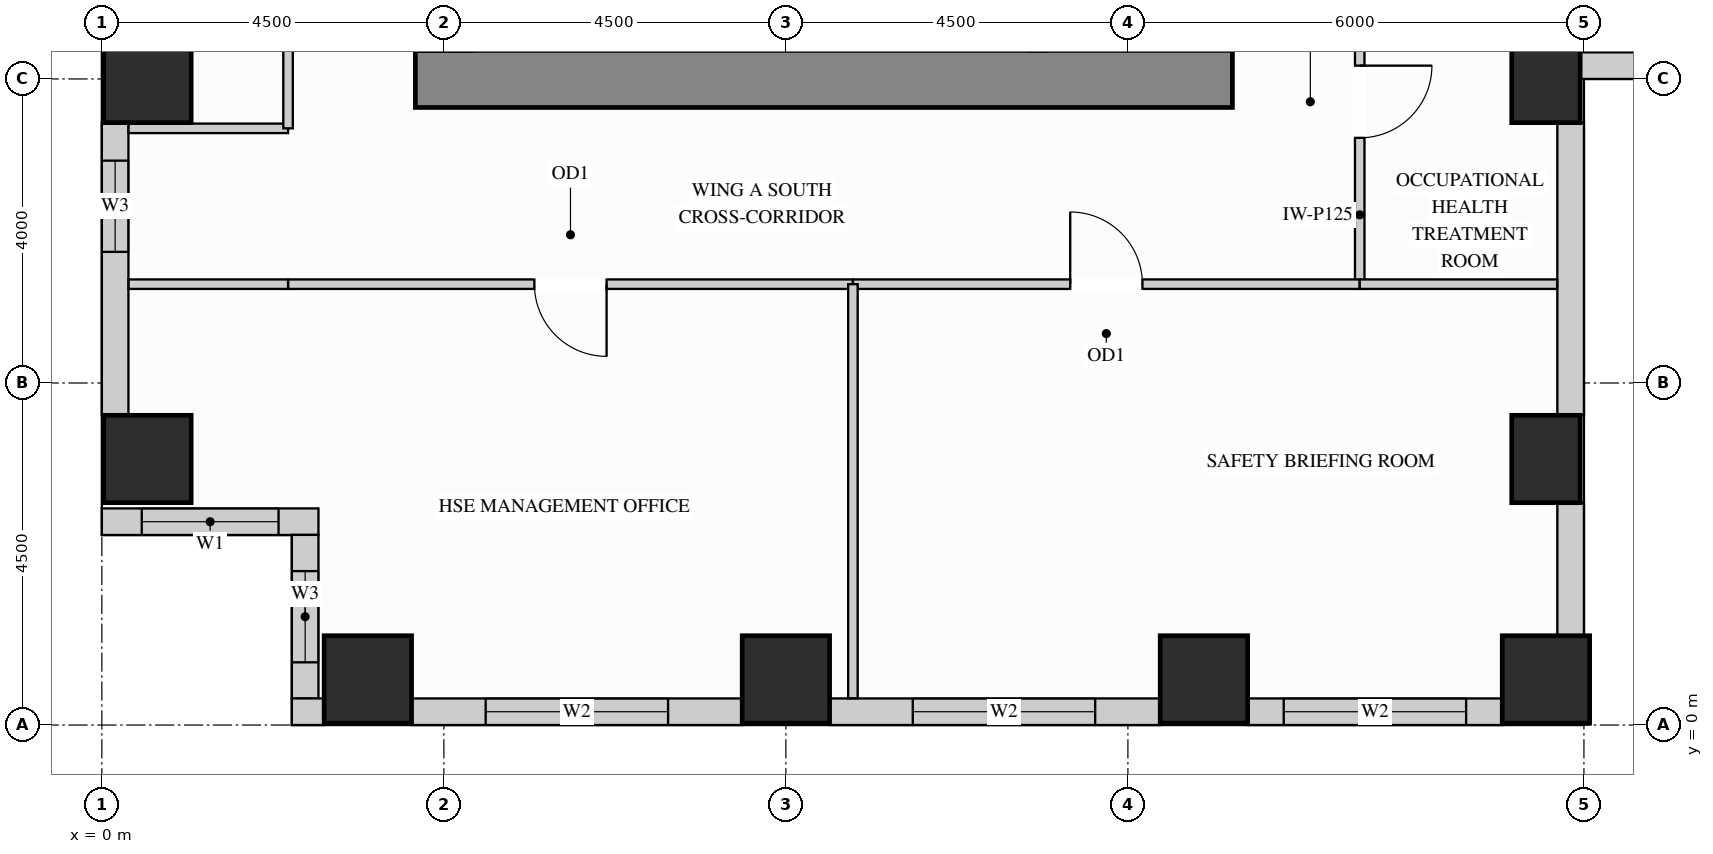
"""IFC4 building model, lengths in metres.
Left out: names, types, materials, properties, quantities, classifications, styles, units other than length and angle.
Written with IfcOpenShell. Run it as: python <this file> out.ifc"""

import sys

from ifc_helpers import new_model, si_unit, direction, frame, frame_2d, origin, origin_2d, place, context, subcontext, project, spatial, rectangle, extrude, source, transform, mapped, element, fill, save


model = new_model("IFC4")
c1 = context("Model", 3, precision=1e-05, world=origin(), true_north=direction((0.0, 1.0)))
c2 = subcontext(c1, "Body", "Model", "MODEL_VIEW")
j1 = project(units=[si_unit("LENGTHUNIT", "METRE"), si_unit("PLANEANGLEUNIT", "RADIAN")], contexts=[c1])
p1 = place(None, origin())
s1 = spatial("IfcSite", under=j1, at=p1, CompositionType="ELEMENT")
p2 = place(p1, origin())
s2 = spatial("IfcBuilding", under=s1, at=p2, CompositionType="ELEMENT")
p3 = place(p2, frame((0.0, 0.0, 91.8)))
s3 = spatial("IfcBuildingStorey", under=s2, at=p3, CompositionType="ELEMENT", Elevation=91.8)
m1 = source(origin(), c2, "Body", "SweptSolid", [
    extrude(rectangle(XDim=0.9, YDim=1.15, at=origin_2d()), origin(), (0.0, 0.0, 1.0), 3.38),
])
for number, where, z_axis, x_axis in (
    (1, (19.0, 3.5, 0.0), (0.0, 0.0, 1.0), (1.0, 0.0, 0.0)),
    (2, (19.0, 8.5, 0.0), (0.0, 0.0, 1.0), (1.0, 0.0, 0.0)),
):
    element("IfcColumn", number, at=place(p3, frame(where, z_axis=z_axis, x_axis=x_axis)), inside=s3, PredefinedType="COLUMN", context=c2, shape_type="MappedRepresentation", body=[
        mapped(m1, transform((0.0, 0.0, 0.0), x_axis=(1.0, 0.0, 0.0), y_axis=(0.0, 1.0, 0.0), z_axis=(0.0, 0.0, 1.0))),
    ])
m2 = source(origin(), c2, "Body", "SweptSolid", [
    extrude(rectangle(XDim=1.15, YDim=1.15, at=origin_2d()), origin(), (0.0, 0.0, 1.0), 3.38),
])
for number, where, z_axis, x_axis in (
    (3, (14.5, 0.6, 0.0), (0.0, 0.0, 1.0), (1.0, 0.0, 0.0)),
    (4, (19.0, 0.6, 0.0), (0.0, 0.0, 1.0), (1.0, 0.0, 0.0)),
    (5, (3.5, 0.6, 0.0), (0.0, 0.0, 1.0), (1.0, 0.0, 0.0)),
    (6, (9.0, 0.6, 0.0), (0.0, 0.0, 1.0), (1.0, 0.0, 0.0)),
    (7, (0.6, 3.5, 0.0), (0.0, 0.0, 1.0), (1.0, 0.0, 0.0)),
    (8, (0.6, 8.5, 0.0), (0.0, 0.0, 1.0), (1.0, 0.0, 0.0)),
):
    element("IfcColumn", number, at=place(p3, frame(where, z_axis=z_axis, x_axis=x_axis)), inside=s3, PredefinedType="COLUMN", context=c2, shape_type="MappedRepresentation", body=[
        mapped(m2, transform((0.0, 0.0, 0.0), x_axis=(1.0, 0.0, 0.0), y_axis=(0.0, 1.0, 0.0), z_axis=(0.0, 0.0, 1.0))),
    ])
m3 = source(origin(), c2, "Body", "SweptSolid", [
    extrude(rectangle(XDim=10.75, YDim=0.75, at=frame_2d((5.375, 0.0))), origin(), (0.0, 0.0, 1.0), 3.38),
])
p4 = place(p3, frame((4.125, 8.5, 0.0), z_axis=(0.0, 0.0, 1.0), x_axis=(1.0, 0.0, 0.0)))
e9 = element("IfcWall", 9, at=p4, inside=s3, PredefinedType="SHEAR", context=c2, shape_type="MappedRepresentation", body=[
    mapped(m3, transform((0.0, 0.0, 0.0), x_axis=(1.0, 0.0, 0.0), y_axis=(0.0, 1.0, 0.0), z_axis=(0.0, 0.0, 1.0))),
])
p5 = place(p3, frame((0.175, 7.927, 0.0), z_axis=(0.0, 0.0, 1.0), x_axis=(0.0, -1.0, 0.0)))
e10 = element("IfcWall", 10, at=p5, inside=s3, PredefinedType="SOLIDWALL", context=c2, shape_type="SweptSolid", body=[
    extrude(rectangle(XDim=3.854, YDim=0.35, at=frame_2d((1.927, 0.0))), origin(), (0.0, 0.0, 1.0), 3.365),
])
p6 = place(p5, frame((0.502, 0.0, 0.78)))
e11 = element("IfcOpeningElement", 11, at=p6, cuts=e10, PredefinedType="OPENING", context=c2, shape_type="SweptSolid", body=[
    extrude(rectangle(XDim=1.2, YDim=2.1, at=frame_2d((0.6, 1.05))), frame((0.0, 0.185, 0.0), z_axis=(0.0, -1.0, 0.0), x_axis=(1.0, 0.0, 0.0)), (0.0, 0.0, 1.0), 0.37),
])
p7 = place(p3, frame((0.0, 2.675, 0.0), z_axis=(0.0, 0.0, 1.0), x_axis=(1.0, 0.0, 0.0)))
e12 = element("IfcWall", 12, at=p7, inside=s3, PredefinedType="SOLIDWALL", context=c2, shape_type="SweptSolid", body=[
    extrude(rectangle(XDim=2.85, YDim=0.35, at=frame_2d((1.425, 0.0))), origin(), (0.0, 0.0, 1.0), 3.365),
])
p8 = place(p7, frame((0.525, 0.0, 0.78)))
e13 = element("IfcOpeningElement", 13, at=p8, cuts=e12, PredefinedType="OPENING", context=c2, shape_type="SweptSolid", body=[
    extrude(rectangle(XDim=1.8, YDim=2.1, at=frame_2d((0.9, 1.05))), frame((0.0, 0.185, 0.0), z_axis=(0.0, -1.0, 0.0), x_axis=(1.0, 0.0, 0.0)), (0.0, 0.0, 1.0), 0.37),
])
p9 = place(p3, frame((2.675, 2.502, 0.0), z_axis=(0.0, 0.0, 1.0), x_axis=(0.0, -1.0, 0.0)))
e14 = element("IfcWall", 14, at=p9, inside=s3, PredefinedType="SOLIDWALL", context=c2, shape_type="SweptSolid", body=[
    extrude(rectangle(XDim=2.154, YDim=0.35, at=frame_2d((1.077, 0.0))), origin(), (0.0, 0.0, 1.0), 3.365),
])
p10 = place(p9, frame((0.477, 0.0, 0.78)))
e15 = element("IfcOpeningElement", 15, at=p10, cuts=e14, PredefinedType="OPENING", context=c2, shape_type="SweptSolid", body=[
    extrude(rectangle(XDim=1.2, YDim=2.1, at=frame_2d((0.6, 1.05))), frame((0.0, 0.185, 0.0), z_axis=(0.0, -1.0, 0.0), x_axis=(1.0, 0.0, 0.0)), (0.0, 0.0, 1.0), 0.37),
])
m4 = source(origin(), c2, "Body", "SweptSolid", [
    extrude(rectangle(XDim=0.427, YDim=0.35, at=frame_2d((0.213, 0.0))), origin(), (0.0, 0.0, 1.0), 3.365),
])
p11 = place(p3, frame((2.5, 0.175, 0.0), z_axis=(0.0, 0.0, 1.0), x_axis=(1.0, 0.0, 0.0)))
e16 = element("IfcWall", 16, at=p11, inside=s3, PredefinedType="SOLIDWALL", context=c2, shape_type="MappedRepresentation", body=[
    mapped(m4, transform((0.0, 0.0, 0.0), x_axis=(1.0, 0.0, 0.0), y_axis=(0.0, 1.0, 0.0), z_axis=(0.0, 0.0, 1.0))),
])
p12 = place(p3, frame((4.073, 0.175, 0.0), z_axis=(0.0, 0.0, 1.0), x_axis=(1.0, 0.0, 0.0)))
e17 = element("IfcWall", 17, at=p12, inside=s3, PredefinedType="SOLIDWALL", context=c2, shape_type="SweptSolid", body=[
    extrude(rectangle(XDim=4.354, YDim=0.35, at=frame_2d((2.177, 0.0))), origin(), (0.0, 0.0, 1.0), 3.365),
])
p13 = place(p12, frame((0.977, 0.0, 0.78)))
e18 = element("IfcOpeningElement", 18, at=p13, cuts=e17, PredefinedType="OPENING", context=c2, shape_type="SweptSolid", body=[
    extrude(rectangle(XDim=2.4, YDim=2.1, at=frame_2d((1.2, 1.05))), frame((0.0, 0.185, 0.0), z_axis=(0.0, -1.0, 0.0), x_axis=(1.0, 0.0, 0.0)), (0.0, 0.0, 1.0), 0.37),
])
p14 = place(p3, frame((9.573, 0.175, 0.0), z_axis=(0.0, 0.0, 1.0), x_axis=(1.0, 0.0, 0.0)))
e19 = element("IfcWall", 19, at=p14, inside=s3, PredefinedType="SOLIDWALL", context=c2, shape_type="SweptSolid", body=[
    extrude(rectangle(XDim=4.354, YDim=0.35, at=frame_2d((2.177, 0.0))), origin(), (0.0, 0.0, 1.0), 3.365),
])
p15 = place(p14, frame((1.096, 0.0, 0.78)))
e20 = element("IfcOpeningElement", 20, at=p15, cuts=e19, PredefinedType="OPENING", context=c2, shape_type="SweptSolid", body=[
    extrude(rectangle(XDim=2.4, YDim=2.1, at=frame_2d((1.2, 1.05))), frame((0.0, 0.185, 0.0), z_axis=(0.0, -1.0, 0.0), x_axis=(1.0, 0.0, 0.0)), (0.0, 0.0, 1.0), 0.37),
])
p16 = place(p3, frame((15.073, 0.175, 0.0), z_axis=(0.0, 0.0, 1.0), x_axis=(1.0, 0.0, 0.0)))
e21 = element("IfcWall", 21, at=p16, inside=s3, PredefinedType="SOLIDWALL", context=c2, shape_type="SweptSolid", body=[
    extrude(rectangle(XDim=3.354, YDim=0.35, at=frame_2d((1.677, 0.0))), origin(), (0.0, 0.0, 1.0), 3.365),
])
p17 = place(p16, frame((0.477, 0.0, 0.78)))
e22 = element("IfcOpeningElement", 22, at=p17, cuts=e21, PredefinedType="OPENING", context=c2, shape_type="SweptSolid", body=[
    extrude(rectangle(XDim=2.4, YDim=2.1, at=frame_2d((1.2, 1.05))), frame((0.0, 0.185, 0.0), z_axis=(0.0, -1.0, 0.0), x_axis=(1.0, 0.0, 0.0)), (0.0, 0.0, 1.0), 0.37),
])
m5 = source(origin(), c2, "Body", "SweptSolid", [
    extrude(rectangle(XDim=1.754, YDim=0.35, at=frame_2d((0.877, 0.0))), origin(), (0.0, 0.0, 1.0), 2.519),
])
p18 = place(p3, frame((19.325, 1.173, 0.0), z_axis=(0.0, 0.0, 1.0), x_axis=(0.0, 1.0, 0.0)))
e23 = element("IfcWall", 23, at=p18, inside=s3, PredefinedType="SOLIDWALL", context=c2, shape_type="MappedRepresentation", body=[
    mapped(m5, transform((0.0, 0.0, 0.0), x_axis=(1.0, 0.0, 0.0), y_axis=(0.0, 1.0, 0.0), z_axis=(0.0, 0.0, 1.0))),
])
m6 = source(origin(), c2, "Body", "SweptSolid", [
    extrude(rectangle(XDim=3.854, YDim=0.35, at=frame_2d((1.927, 0.0))), origin(), (0.0, 0.0, 1.0), 2.519),
])
p19 = place(p3, frame((19.325, 4.073, 0.0), z_axis=(0.0, 0.0, 1.0), x_axis=(0.0, 1.0, 0.0)))
e24 = element("IfcWall", 24, at=p19, inside=s3, PredefinedType="SOLIDWALL", context=c2, shape_type="MappedRepresentation", body=[
    mapped(m6, transform((0.0, 0.0, 0.0), x_axis=(1.0, 0.0, 0.0), y_axis=(0.0, 1.0, 0.0), z_axis=(0.0, 0.0, 1.0))),
])
p20 = place(p3, frame((19.448, 8.675, 0.0), z_axis=(0.0, 0.0, 1.0), x_axis=(1.0, 0.0, 0.0)))
e25 = element("IfcWall", 25, at=p20, inside=s3, PredefinedType="SOLIDWALL", context=c2, shape_type="SweptSolid", body=[
    extrude(rectangle(XDim=3.504, YDim=0.35, at=frame_2d((1.752, 0.0))), origin(), (0.0, 0.0, 1.0), 3.365),
])
p21 = place(p20, frame((1.002, 0.0, 0.78)))
e26 = element("IfcOpeningElement", 26, at=p21, cuts=e25, PredefinedType="OPENING", context=c2, shape_type="SweptSolid", body=[
    extrude(rectangle(XDim=1.5, YDim=2.0, at=frame_2d((0.75, 1.0))), frame((0.0, 0.185, 0.0), z_axis=(0.0, -1.0, 0.0), x_axis=(1.0, 0.0, 0.0)), (0.0, 0.0, 1.0), 0.37),
])
p22 = place(p3, frame((16.55, 5.8, 0.0), z_axis=(0.0, 0.0, 1.0), x_axis=(0.0, 1.0, 0.0)))
e27 = element("IfcWall", 27, at=p22, inside=s3, PredefinedType="PARTITIONING", context=c2, shape_type="SweptSolid", body=[
    extrude(rectangle(XDim=4.8, YDim=0.125, at=frame_2d((2.4, 0.0))), origin(), (0.0, 0.0, 1.0), 3.365),
])
p23 = place(p22, frame((1.925, 0.0, 0.0)))
e28 = element("IfcOpeningElement", 28, at=p23, cuts=e27, PredefinedType="OPENING", context=c2, shape_type="SweptSolid", body=[
    extrude(rectangle(XDim=0.95, YDim=2.15, at=frame_2d((0.475, 1.075))), frame((0.0, 0.073, 0.0), z_axis=(0.0, -1.0, 0.0), x_axis=(1.0, 0.0, 0.0)), (0.0, 0.0, 1.0), 0.145),
])
m7 = source(origin(), c2, "Body", "SweptSolid", [
    extrude(rectangle(XDim=2.098, YDim=0.125, at=frame_2d((1.049, 0.0))), origin(), (0.0, 0.0, 1.0), 3.365),
])
p24 = place(p3, frame((0.352, 7.85, 0.0), z_axis=(0.0, 0.0, 1.0), x_axis=(1.0, 0.0, 0.0)))
e29 = element("IfcWall", 29, at=p24, inside=s3, PredefinedType="PARTITIONING", context=c2, shape_type="MappedRepresentation", body=[
    mapped(m7, transform((0.0, 0.0, 0.0), x_axis=(1.0, 0.0, 0.0), y_axis=(0.0, 1.0, 0.0), z_axis=(0.0, 0.0, 1.0))),
])
p25 = place(p3, frame((2.45, 5.8, 0.0), z_axis=(0.0, 0.0, 1.0), x_axis=(1.0, 0.0, 0.0)))
e30 = element("IfcWall", 30, at=p25, inside=s3, PredefinedType="PARTITIONING", context=c2, shape_type="SweptSolid", body=[
    extrude(rectangle(XDim=7.432, YDim=0.125, at=frame_2d((3.716, 0.0))), origin(), (0.0, 0.0, 1.0), 3.365),
])
p26 = place(p25, frame((3.241, 0.0, 0.0)))
e31 = element("IfcOpeningElement", 31, at=p26, cuts=e30, PredefinedType="OPENING", context=c2, shape_type="SweptSolid", body=[
    extrude(rectangle(XDim=0.95, YDim=2.15, at=frame_2d((0.475, 1.075))), frame((0.0, 0.073, 0.0), z_axis=(0.0, -1.0, 0.0), x_axis=(1.0, 0.0, 0.0)), (0.0, 0.0, 1.0), 0.145),
])
p27 = place(p3, frame((9.882, 5.8, 0.0), z_axis=(0.0, 0.0, 1.0), x_axis=(1.0, 0.0, 0.0)))
e32 = element("IfcWall", 32, at=p27, inside=s3, PredefinedType="PARTITIONING", context=c2, shape_type="SweptSolid", body=[
    extrude(rectangle(XDim=6.668, YDim=0.125, at=frame_2d((3.334, 0.0))), origin(), (0.0, 0.0, 1.0), 3.365),
])
p28 = place(p27, frame((2.859, 0.0, 0.0)))
e33 = element("IfcOpeningElement", 33, at=p28, cuts=e32, PredefinedType="OPENING", context=c2, shape_type="SweptSolid", body=[
    extrude(rectangle(XDim=0.95, YDim=2.15, at=frame_2d((0.475, 1.075))), frame((0.0, 0.073, 0.0), z_axis=(0.0, -1.0, 0.0), x_axis=(1.0, 0.0, 0.0)), (0.0, 0.0, 1.0), 0.145),
])
p29 = place(p3, frame((0.352, 5.8, 0.0), z_axis=(0.0, 0.0, 1.0), x_axis=(1.0, 0.0, 0.0)))
e34 = element("IfcWall", 34, at=p29, inside=s3, PredefinedType="PARTITIONING", context=c2, shape_type="MappedRepresentation", body=[
    mapped(m7, transform((0.0, 0.0, 0.0), x_axis=(1.0, 0.0, 0.0), y_axis=(0.0, 1.0, 0.0), z_axis=(0.0, 0.0, 1.0))),
])
m8 = source(origin(), c2, "Body", "SweptSolid", [
    extrude(rectangle(XDim=2.598, YDim=0.125, at=frame_2d((1.299, 0.0))), origin(), (0.0, 0.0, 1.0), 3.365),
])
p30 = place(p3, frame((16.55, 5.8, 0.0), z_axis=(0.0, 0.0, 1.0), x_axis=(1.0, 0.0, 0.0)))
e35 = element("IfcWall", 35, at=p30, inside=s3, PredefinedType="PARTITIONING", context=c2, shape_type="MappedRepresentation", body=[
    mapped(m8, transform((0.0, 0.0, 0.0), x_axis=(1.0, 0.0, 0.0), y_axis=(0.0, 1.0, 0.0), z_axis=(0.0, 0.0, 1.0))),
])
m9 = source(origin(), c2, "Body", "SweptSolid", [
    extrude(rectangle(XDim=5.448, YDim=0.125, at=frame_2d((2.724, 0.0))), origin(), (0.0, 0.0, 1.0), 3.365),
])
p31 = place(p3, frame((9.882, 0.352, 0.0), z_axis=(0.0, 0.0, 1.0), x_axis=(0.0, 1.0, 0.0)))
e36 = element("IfcWall", 36, at=p31, inside=s3, PredefinedType="PARTITIONING", context=c2, shape_type="MappedRepresentation", body=[
    mapped(m9, transform((0.0, 0.0, 0.0), x_axis=(1.0, 0.0, 0.0), y_axis=(0.0, 1.0, 0.0), z_axis=(0.0, 0.0, 1.0))),
])
p32 = place(p3, frame((2.45, 7.85, 0.0), z_axis=(0.0, 0.0, 1.0), x_axis=(0.0, 1.0, 0.0)))
e37 = element("IfcWall", 37, at=p32, inside=s3, PredefinedType="PARTITIONING", context=c2, shape_type="SweptSolid", body=[
    extrude(rectangle(XDim=7.25, YDim=0.125, at=frame_2d((3.625, 0.0))), origin(), (0.0, 0.0, 1.0), 3.365),
])
p33 = place(p32, frame((3.15, 0.0, 0.0)))
e38 = element("IfcOpeningElement", 38, at=p33, cuts=e37, PredefinedType="OPENING", context=c2, shape_type="SweptSolid", body=[
    extrude(rectangle(XDim=0.95, YDim=2.15, at=frame_2d((0.475, 1.075))), frame((0.0, 0.073, 0.0), z_axis=(0.0, -1.0, 0.0), x_axis=(1.0, 0.0, 0.0)), (0.0, 0.0, 1.0), 0.145),
])
m10 = source(origin(), c2, "Body", "SweptSolid", [
    extrude(rectangle(XDim=0.95, YDim=2.15, at=frame_2d((0.475, 1.075))), frame((0.0, 0.025, 0.0), z_axis=(0.0, -1.0, 0.0), x_axis=(1.0, 0.0, 0.0)), (0.0, 0.0, 1.0), 0.05),
])
p34 = place(p23, origin())
e39 = element("IfcDoor", 39, at=p34, inside=s3, OperationType="SINGLE_SWING_RIGHT", PredefinedType="DOOR", context=c2, shape_type="MappedRepresentation", body=[
    mapped(m10, transform((0.0, 0.0, 0.0), x_axis=(1.0, 0.0, 0.0), y_axis=(0.0, 1.0, 0.0), z_axis=(0.0, 0.0, 1.0))),
])
fill(e28, e39)
p35 = place(p26, origin())
e40 = element("IfcDoor", 40, at=p35, inside=s3, OperationType="SINGLE_SWING_RIGHT", PredefinedType="DOOR", context=c2, shape_type="MappedRepresentation", body=[
    mapped(m10, transform((0.0, 0.0, 0.0), x_axis=(1.0, 0.0, 0.0), y_axis=(0.0, 1.0, 0.0), z_axis=(0.0, 0.0, 1.0))),
])
fill(e31, e40)
p36 = place(p28, origin())
e41 = element("IfcDoor", 41, at=p36, inside=s3, OperationType="SINGLE_SWING_LEFT", PredefinedType="DOOR", context=c2, shape_type="MappedRepresentation", body=[
    mapped(m10, transform((0.0, 0.0, 0.0), x_axis=(1.0, 0.0, 0.0), y_axis=(0.0, 1.0, 0.0), z_axis=(0.0, 0.0, 1.0))),
])
fill(e33, e41)
m11 = source(origin(), c2, "Body", "SweptSolid", [
    extrude(rectangle(XDim=1.8, YDim=2.1, at=frame_2d((0.9, 1.05))), frame((0.0, 0.03, 0.0), z_axis=(0.0, -1.0, 0.0), x_axis=(1.0, 0.0, 0.0)), (0.0, 0.0, 1.0), 0.06),
])
p37 = place(p8, origin())
e42 = element("IfcWindow", 42, at=p37, inside=s3, PartitioningType="SINGLE_PANEL", PredefinedType="WINDOW", context=c2, shape_type="MappedRepresentation", body=[
    mapped(m11, transform((0.0, 0.0, 0.0), x_axis=(1.0, 0.0, 0.0), y_axis=(0.0, 1.0, 0.0), z_axis=(0.0, 0.0, 1.0))),
])
fill(e13, e42)
m12 = source(origin(), c2, "Body", "SweptSolid", [
    extrude(rectangle(XDim=2.4, YDim=2.1, at=frame_2d((1.2, 1.05))), frame((0.0, 0.03, 0.0), z_axis=(0.0, -1.0, 0.0), x_axis=(1.0, 0.0, 0.0)), (0.0, 0.0, 1.0), 0.06),
])
p38 = place(p13, origin())
e43 = element("IfcWindow", 43, at=p38, inside=s3, PartitioningType="SINGLE_PANEL", PredefinedType="WINDOW", context=c2, shape_type="MappedRepresentation", body=[
    mapped(m12, transform((0.0, 0.0, 0.0), x_axis=(1.0, 0.0, 0.0), y_axis=(0.0, 1.0, 0.0), z_axis=(0.0, 0.0, 1.0))),
])
fill(e18, e43)
p39 = place(p15, origin())
e44 = element("IfcWindow", 44, at=p39, inside=s3, PartitioningType="SINGLE_PANEL", PredefinedType="WINDOW", context=c2, shape_type="MappedRepresentation", body=[
    mapped(m12, transform((0.0, 0.0, 0.0), x_axis=(1.0, 0.0, 0.0), y_axis=(0.0, 1.0, 0.0), z_axis=(0.0, 0.0, 1.0))),
])
fill(e20, e44)
p40 = place(p17, origin())
e45 = element("IfcWindow", 45, at=p40, inside=s3, PartitioningType="SINGLE_PANEL", PredefinedType="WINDOW", context=c2, shape_type="MappedRepresentation", body=[
    mapped(m12, transform((0.0, 0.0, 0.0), x_axis=(1.0, 0.0, 0.0), y_axis=(0.0, 1.0, 0.0), z_axis=(0.0, 0.0, 1.0))),
])
fill(e22, e45)
m13 = source(origin(), c2, "Body", "SweptSolid", [
    extrude(rectangle(XDim=1.2, YDim=2.1, at=frame_2d((0.6, 1.05))), frame((0.0, 0.03, 0.0), z_axis=(0.0, -1.0, 0.0), x_axis=(1.0, 0.0, 0.0)), (0.0, 0.0, 1.0), 0.06),
])
p41 = place(p6, origin())
e46 = element("IfcWindow", 46, at=p41, inside=s3, PartitioningType="SINGLE_PANEL", PredefinedType="WINDOW", context=c2, shape_type="MappedRepresentation", body=[
    mapped(m13, transform((0.0, 0.0, 0.0), x_axis=(1.0, 0.0, 0.0), y_axis=(0.0, 1.0, 0.0), z_axis=(0.0, 0.0, 1.0))),
])
fill(e11, e46)
p42 = place(p10, origin())
e47 = element("IfcWindow", 47, at=p42, inside=s3, PartitioningType="SINGLE_PANEL", PredefinedType="WINDOW", context=c2, shape_type="MappedRepresentation", body=[
    mapped(m13, transform((0.0, 0.0, 0.0), x_axis=(1.0, 0.0, 0.0), y_axis=(0.0, 1.0, 0.0), z_axis=(0.0, 0.0, 1.0))),
])
fill(e15, e47)
save(model, sys.argv[1])
